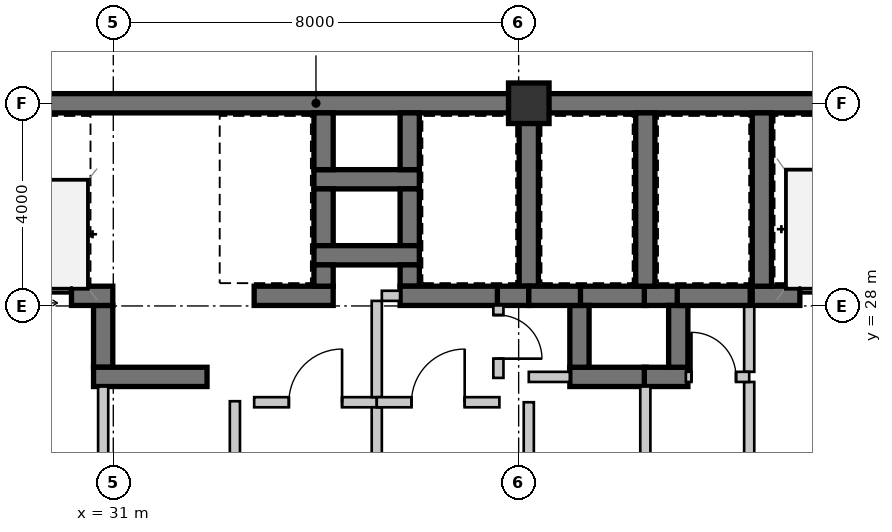
"""IFC4 building model, lengths in metres.
Left out: names, types, materials, properties, quantities, classifications, styles, units other than length and angle.
Written with IfcOpenShell. Run it as: python <this file> out.ifc"""

import sys

from ifc_helpers import new_model, si_unit, direction, frame, frame_2d, origin, origin_2d, place, context, subcontext, project, spatial, rectangle, extrude, source, transform, mapped, element, fill, save


model = new_model("IFC4")
c1 = context("Model", 3, precision=1e-05, world=origin(), true_north=direction((0.0, 1.0)))
c2 = subcontext(c1, "Body", "Model", "MODEL_VIEW")
j1 = project(units=[si_unit("LENGTHUNIT", "METRE"), si_unit("PLANEANGLEUNIT", "RADIAN")], contexts=[c1])
p1 = place(None, origin())
s1 = spatial("IfcSite", under=j1, at=p1, CompositionType="ELEMENT")
p2 = place(p1, origin())
s2 = spatial("IfcBuilding", under=s1, at=p2, CompositionType="ELEMENT")
p3 = place(p2, frame((0.0, 0.0, 45.15)))
s3 = spatial("IfcBuildingStorey", under=s2, at=p3, CompositionType="ELEMENT", Elevation=45.15)
m1 = source(origin(), c2, "Body", "SweptSolid", [
    extrude(rectangle(XDim=0.8, YDim=0.8, at=origin_2d()), origin(), (0.0, 0.0, 1.0), 3.15),
])
p4 = place(p3, frame((39.2, 32.0, 0.0), z_axis=(0.0, 0.0, 1.0), x_axis=(1.0, 0.0, 0.0)))
e1 = element("IfcColumn", 1, at=p4, inside=s3, PredefinedType="COLUMN", context=c2, shape_type="MappedRepresentation", body=[
    mapped(m1, transform((0.0, 0.0, 0.0), scale=1.0)),
])
m2 = source(origin(), c2, "Body", "SweptSolid", [
    extrude(rectangle(XDim=11.2, YDim=0.38, at=frame_2d((5.6, 0.0))), origin(), (0.0, 0.0, 1.0), 2.93),
])
p5 = place(p3, frame((28.0, 32.0, 0.0), z_axis=(0.0, 0.0, 1.0), x_axis=(1.0, 0.0, 0.0)))
e2 = element("IfcWall", 2, at=p5, inside=s3, PredefinedType="SHEAR", context=c2, shape_type="MappedRepresentation", body=[
    mapped(m2, transform((0.0, 0.0, 0.0), scale=1.0)),
])
m3 = source(origin(), c2, "Body", "SweptSolid", [
    extrude(rectangle(XDim=11.99, YDim=0.38, at=frame_2d((5.995, 0.0))), origin(), (0.0, 0.0, 1.0), 2.93),
])
p6 = place(p3, frame((39.2, 32.0, 0.0), z_axis=(0.0, 0.0, 1.0), x_axis=(1.0, 0.0, 0.0)))
e3 = element("IfcWall", 3, at=p6, inside=s3, PredefinedType="SHEAR", context=c2, shape_type="MappedRepresentation", body=[
    mapped(m3, transform((0.0, 0.0, 0.0), scale=1.0)),
])
m4 = source(origin(), c2, "Body", "SweptSolid", [
    extrude(rectangle(XDim=2.98, YDim=0.38, at=frame_2d((1.49, 0.0))), origin(), (0.0, 0.0, 1.0), 2.93),
])
p7 = place(p3, frame((43.61, 28.2, 0.0), z_axis=(0.0, 0.0, 1.0), x_axis=(1.0, 0.0, 0.0)))
e4 = element("IfcWall", 4, at=p7, inside=s3, PredefinedType="SHEAR", context=c2, shape_type="MappedRepresentation", body=[
    mapped(m4, transform((0.0, 0.0, 0.0), scale=1.0)),
])
m5 = source(origin(), c2, "Body", "SweptSolid", [
    extrude(rectangle(XDim=1.1, YDim=2.15, at=frame_2d((0.55, 1.075))), frame((0.0, 0.2, 0.0), z_axis=(0.0, -1.0, 0.0), x_axis=(1.0, 0.0, 0.0)), (0.0, 0.0, 1.0), 0.4),
])
p8 = place(p7, frame((0.94, 0.0, 0.0)))
e5 = element("IfcOpeningElement", 5, at=p8, cuts=e4, PredefinedType="OPENING", context=c2, shape_type="MappedRepresentation", body=[
    mapped(m5, transform((0.0, 0.0, 0.0), scale=1.0)),
])
m6 = source(origin(), c2, "Body", "SweptSolid", [
    extrude(rectangle(XDim=3.42, YDim=0.38, at=frame_2d((1.71, 0.0))), origin(), (0.0, 0.0, 1.0), 2.93),
])
p9 = place(p3, frame((43.8, 31.81, 0.0), z_axis=(0.0, 0.0, 1.0), x_axis=(0.0, -1.0, 0.0)))
e6 = element("IfcWall", 6, at=p9, inside=s3, PredefinedType="SHEAR", context=c2, shape_type="MappedRepresentation", body=[
    mapped(m6, transform((0.0, 0.0, 0.0), scale=1.0)),
])
m7 = source(origin(), c2, "Body", "SweptSolid", [
    extrude(rectangle(XDim=2.4, YDim=0.2, at=frame_2d((1.2, 0.0))), origin(), (0.0, 0.0, 1.0), 2.93),
])
p10 = place(p3, frame((43.55, 26.5, 0.0), z_axis=(0.0, 0.0, 1.0), x_axis=(0.0, -1.0, 0.0)))
e7 = element("IfcWall", 7, at=p10, inside=s3, PredefinedType="SOLIDWALL", context=c2, shape_type="MappedRepresentation", body=[
    mapped(m7, transform((0.0, 0.0, 0.0), scale=1.0)),
])
m8 = source(origin(), c2, "Body", "SweptSolid", [
    extrude(rectangle(XDim=1.31, YDim=0.2, at=frame_2d((0.655, 0.0))), origin(), (0.0, 0.0, 1.0), 2.93),
])
p11 = place(p3, frame((43.55, 28.01, 0.0), z_axis=(0.0, 0.0, 1.0), x_axis=(0.0, -1.0, 0.0)))
e8 = element("IfcWall", 8, at=p11, inside=s3, PredefinedType="SOLIDWALL", context=c2, shape_type="MappedRepresentation", body=[
    mapped(m8, transform((0.0, 0.0, 0.0), scale=1.0)),
])
m9 = source(origin(), c2, "Body", "SweptSolid", [
    extrude(rectangle(XDim=2.08, YDim=0.38, at=frame_2d((1.04, 0.0))), origin(), (0.0, 0.0, 1.0), 2.93),
])
p12 = place(p3, frame((34.96, 30.5, 0.0), z_axis=(0.0, 0.0, 1.0), x_axis=(1.0, 0.0, 0.0)))
e9 = element("IfcWall", 9, at=p12, inside=s3, PredefinedType="SHEAR", context=c2, shape_type="MappedRepresentation", body=[
    mapped(m9, transform((0.0, 0.0, 0.0), scale=1.0)),
])
m10 = source(origin(), c2, "Body", "SweptSolid", [
    extrude(rectangle(XDim=1.12, YDim=0.38, at=frame_2d((0.56, 0.0))), origin(), (0.0, 0.0, 1.0), 2.93),
])
for number, where, z_axis, x_axis in (
    (10, (35.15, 31.81, 0.0), (0.0, 0.0, 1.0), (0.0, -1.0, 0.0)),
    (11, (36.85, 30.69, 0.0), (0.0, 0.0, 1.0), (0.0, 1.0, 0.0)),
    (12, (35.15, 30.31, 0.0), (0.0, 0.0, 1.0), (0.0, -1.0, 0.0)),
    (13, (36.85, 29.19, 0.0), (0.0, 0.0, 1.0), (0.0, 1.0, 0.0)),
):
    element("IfcWall", number, at=place(p3, frame(where, z_axis=z_axis, x_axis=x_axis)), inside=s3, PredefinedType="SHEAR", context=c2, shape_type="MappedRepresentation", body=[
        mapped(m10, transform((0.0, 0.0, 0.0), scale=1.0)),
    ])
p13 = place(p3, frame((34.96, 29.0, 0.0), z_axis=(0.0, 0.0, 1.0), x_axis=(1.0, 0.0, 0.0)))
e14 = element("IfcWall", 14, at=p13, inside=s3, PredefinedType="SHEAR", context=c2, shape_type="MappedRepresentation", body=[
    mapped(m9, transform((0.0, 0.0, 0.0), scale=1.0)),
])
m11 = source(origin(), c2, "Body", "SweptSolid", [
    extrude(rectangle(XDim=1.22, YDim=0.38, at=frame_2d((0.61, 0.0))), origin(), (0.0, 0.0, 1.0), 2.93),
])
p14 = place(p3, frame((30.8, 28.01, 0.0), z_axis=(0.0, 0.0, 1.0), x_axis=(0.0, -1.0, 0.0)))
e15 = element("IfcWall", 15, at=p14, inside=s3, PredefinedType="SHEAR", context=c2, shape_type="MappedRepresentation", body=[
    mapped(m11, transform((0.0, 0.0, 0.0), scale=1.0)),
])
m12 = source(origin(), c2, "Body", "SweptSolid", [
    extrude(rectangle(XDim=2.24, YDim=0.38, at=frame_2d((1.12, 0.0))), origin(), (0.0, 0.0, 1.0), 2.93),
])
p15 = place(p3, frame((30.61, 26.6, 0.0), z_axis=(0.0, 0.0, 1.0), x_axis=(1.0, 0.0, 0.0)))
e16 = element("IfcWall", 16, at=p15, inside=s3, PredefinedType="SHEAR", context=c2, shape_type="MappedRepresentation", body=[
    mapped(m12, transform((0.0, 0.0, 0.0), scale=1.0)),
])
m13 = source(origin(), c2, "Body", "SweptSolid", [
    extrude(rectangle(XDim=1.32, YDim=0.38, at=frame_2d((0.66, 0.0))), origin(), (0.0, 0.0, 1.0), 2.93),
])
p16 = place(p3, frame((41.52, 28.2, 0.0), z_axis=(0.0, 0.0, 1.0), x_axis=(-1.0, 0.0, 0.0)))
e17 = element("IfcWall", 17, at=p16, inside=s3, PredefinedType="SHEAR", context=c2, shape_type="MappedRepresentation", body=[
    mapped(m13, transform((0.0, 0.0, 0.0), scale=1.0)),
])
m14 = source(origin(), c2, "Body", "SweptSolid", [
    extrude(rectangle(XDim=0.67, YDim=0.38, at=frame_2d((0.335, 0.0))), origin(), (0.0, 0.0, 1.0), 2.93),
])
p17 = place(p3, frame((42.15, 28.2, 0.0), z_axis=(0.0, 0.0, 1.0), x_axis=(-1.0, 0.0, 0.0)))
e18 = element("IfcWall", 18, at=p17, inside=s3, PredefinedType="SHEAR", context=c2, shape_type="MappedRepresentation", body=[
    mapped(m14, transform((0.0, 0.0, 0.0), scale=1.0)),
])
m15 = source(origin(), c2, "Body", "SweptSolid", [
    extrude(rectangle(XDim=1.51, YDim=0.38, at=frame_2d((0.755, 0.0))), origin(), (0.0, 0.0, 1.0), 2.93),
])
p18 = place(p3, frame((40.01, 26.6, 0.0), z_axis=(0.0, 0.0, 1.0), x_axis=(1.0, 0.0, 0.0)))
e19 = element("IfcWall", 19, at=p18, inside=s3, PredefinedType="SHEAR", context=c2, shape_type="MappedRepresentation", body=[
    mapped(m15, transform((0.0, 0.0, 0.0), scale=1.0)),
])
p19 = place(p3, frame((40.2, 28.01, 0.0), z_axis=(0.0, 0.0, 1.0), x_axis=(0.0, -1.0, 0.0)))
e20 = element("IfcWall", 20, at=p19, inside=s3, PredefinedType="SHEAR", context=c2, shape_type="MappedRepresentation", body=[
    mapped(m11, transform((0.0, 0.0, 0.0), scale=1.0)),
])
m16 = source(origin(), c2, "Body", "SweptSolid", [
    extrude(rectangle(XDim=0.86, YDim=0.38, at=frame_2d((0.43, 0.0))), origin(), (0.0, 0.0, 1.0), 2.93),
])
p20 = place(p3, frame((41.48, 26.6, 0.0), z_axis=(0.0, 0.0, 1.0), x_axis=(1.0, 0.0, 0.0)))
e21 = element("IfcWall", 21, at=p20, inside=s3, PredefinedType="SHEAR", context=c2, shape_type="MappedRepresentation", body=[
    mapped(m16, transform((0.0, 0.0, 0.0), scale=1.0)),
])
p21 = place(p3, frame((42.15, 26.79, 0.0), z_axis=(0.0, 0.0, 1.0), x_axis=(0.0, 1.0, 0.0)))
e22 = element("IfcWall", 22, at=p21, inside=s3, PredefinedType="SHEAR", context=c2, shape_type="MappedRepresentation", body=[
    mapped(m11, transform((0.0, 0.0, 0.0), scale=1.0)),
])
m17 = source(origin(), c2, "Body", "SweptSolid", [
    extrude(rectangle(XDim=2.49, YDim=0.38, at=frame_2d((1.245, 0.0))), origin(), (0.0, 0.0, 1.0), 2.93),
])
p22 = place(p3, frame((28.5, 28.2, 0.0), z_axis=(0.0, 0.0, 1.0), x_axis=(1.0, 0.0, 0.0)))
e23 = element("IfcWall", 23, at=p22, inside=s3, PredefinedType="SHEAR", context=c2, shape_type="MappedRepresentation", body=[
    mapped(m17, transform((0.0, 0.0, 0.0), scale=1.0)),
])
m18 = source(origin(), c2, "Body", "SweptSolid", [
    extrude(rectangle(XDim=1.05, YDim=2.15, at=frame_2d((0.525, 1.075))), frame((0.0, 0.2, 0.0), z_axis=(0.0, -1.0, 0.0), x_axis=(1.0, 0.0, 0.0)), (0.0, 0.0, 1.0), 0.4),
])
p23 = place(p22, frame((0.625, 0.0, 0.0)))
e24 = element("IfcOpeningElement", 24, at=p23, cuts=e23, PredefinedType="OPENING", context=c2, shape_type="MappedRepresentation", body=[
    mapped(m18, transform((0.0, 0.0, 0.0), scale=1.0)),
])
m19 = source(origin(), c2, "Body", "SweptSolid", [
    extrude(rectangle(XDim=2.31, YDim=0.2, at=frame_2d((1.155, 0.0))), origin(), (0.0, 0.0, 1.0), 2.93),
])
p24 = place(p3, frame((30.8, 26.41, 0.0), z_axis=(0.0, 0.0, 1.0), x_axis=(0.0, -1.0, 0.0)))
e25 = element("IfcWall", 25, at=p24, inside=s3, PredefinedType="SOLIDWALL", context=c2, shape_type="MappedRepresentation", body=[
    mapped(m19, transform((0.0, 0.0, 0.0), scale=1.0)),
])
m20 = source(origin(), c2, "Body", "SweptSolid", [
    extrude(rectangle(XDim=1.56, YDim=0.38, at=frame_2d((0.78, 0.0))), origin(), (0.0, 0.0, 1.0), 2.93),
])
p25 = place(p3, frame((33.78, 28.2, 0.0), z_axis=(0.0, 0.0, 1.0), x_axis=(1.0, 0.0, 0.0)))
e26 = element("IfcWall", 26, at=p25, inside=s3, PredefinedType="SHEAR", context=c2, shape_type="MappedRepresentation", body=[
    mapped(m20, transform((0.0, 0.0, 0.0), scale=1.0)),
])
m21 = source(origin(), c2, "Body", "SweptSolid", [
    extrude(rectangle(XDim=0.42, YDim=0.38, at=frame_2d((0.21, 0.0))), origin(), (0.0, 0.0, 1.0), 2.93),
])
p26 = place(p3, frame((35.15, 28.39, 0.0), z_axis=(0.0, 0.0, 1.0), x_axis=(0.0, 1.0, 0.0)))
e27 = element("IfcWall", 27, at=p26, inside=s3, PredefinedType="SHEAR", context=c2, shape_type="MappedRepresentation", body=[
    mapped(m21, transform((0.0, 0.0, 0.0), scale=1.0)),
])
p27 = place(p3, frame((39.2, 28.39, 0.0), z_axis=(0.0, 0.0, 1.0), x_axis=(0.0, 1.0, 0.0)))
e28 = element("IfcWall", 28, at=p27, inside=s3, PredefinedType="SHEAR", context=c2, shape_type="MappedRepresentation", body=[
    mapped(m6, transform((0.0, 0.0, 0.0), scale=1.0)),
])
p28 = place(p3, frame((36.85, 28.81, 0.0), z_axis=(0.0, 0.0, 1.0), x_axis=(0.0, -1.0, 0.0)))
e29 = element("IfcWall", 29, at=p28, inside=s3, PredefinedType="SHEAR", context=c2, shape_type="MappedRepresentation", body=[
    mapped(m21, transform((0.0, 0.0, 0.0), scale=1.0)),
])
m22 = source(origin(), c2, "Body", "SweptSolid", [
    extrude(rectangle(XDim=1.96, YDim=0.38, at=frame_2d((0.98, 0.0))), origin(), (0.0, 0.0, 1.0), 2.93),
])
p29 = place(p3, frame((36.66, 28.2, 0.0), z_axis=(0.0, 0.0, 1.0), x_axis=(1.0, 0.0, 0.0)))
e30 = element("IfcWall", 30, at=p29, inside=s3, PredefinedType="SHEAR", context=c2, shape_type="MappedRepresentation", body=[
    mapped(m22, transform((0.0, 0.0, 0.0), scale=1.0)),
])
m23 = source(origin(), c2, "Body", "SweptSolid", [
    extrude(rectangle(XDim=0.62, YDim=0.38, at=frame_2d((0.31, 0.0))), origin(), (0.0, 0.0, 1.0), 2.93),
])
p30 = place(p3, frame((38.58, 28.2, 0.0), z_axis=(0.0, 0.0, 1.0), x_axis=(1.0, 0.0, 0.0)))
e31 = element("IfcWall", 31, at=p30, inside=s3, PredefinedType="SHEAR", context=c2, shape_type="MappedRepresentation", body=[
    mapped(m23, transform((0.0, 0.0, 0.0), scale=1.0)),
])
p31 = place(p3, frame((41.5, 28.39, 0.0), z_axis=(0.0, 0.0, 1.0), x_axis=(0.0, 1.0, 0.0)))
e32 = element("IfcWall", 32, at=p31, inside=s3, PredefinedType="SHEAR", context=c2, shape_type="MappedRepresentation", body=[
    mapped(m6, transform((0.0, 0.0, 0.0), scale=1.0)),
])
m24 = source(origin(), c2, "Body", "SweptSolid", [
    extrude(rectangle(XDim=1.02, YDim=0.38, at=frame_2d((0.51, 0.0))), origin(), (0.0, 0.0, 1.0), 2.93),
])
p32 = place(p3, frame((39.2, 28.2, 0.0), z_axis=(0.0, 0.0, 1.0), x_axis=(1.0, 0.0, 0.0)))
e33 = element("IfcWall", 33, at=p32, inside=s3, PredefinedType="SHEAR", context=c2, shape_type="MappedRepresentation", body=[
    mapped(m24, transform((0.0, 0.0, 0.0), scale=1.0)),
])
m25 = source(origin(), c2, "Body", "SweptSolid", [
    extrude(rectangle(XDim=1.44, YDim=0.38, at=frame_2d((0.72, 0.0))), origin(), (0.0, 0.0, 1.0), 2.93),
])
p33 = place(p3, frame((42.13, 28.2, 0.0), z_axis=(0.0, 0.0, 1.0), x_axis=(1.0, 0.0, 0.0)))
e34 = element("IfcWall", 34, at=p33, inside=s3, PredefinedType="SHEAR", context=c2, shape_type="MappedRepresentation", body=[
    mapped(m25, transform((0.0, 0.0, 0.0), scale=1.0)),
])
m26 = source(origin(), c2, "Body", "SweptSolid", [
    extrude(rectangle(XDim=2.02, YDim=0.2, at=frame_2d((1.01, 0.0))), origin(), (0.0, 0.0, 1.0), 2.93),
])
p34 = place(p3, frame((33.4, 26.12, 0.0), z_axis=(0.0, 0.0, 1.0), x_axis=(0.0, -1.0, 0.0)))
e35 = element("IfcWall", 35, at=p34, inside=s3, PredefinedType="SOLIDWALL", context=c2, shape_type="MappedRepresentation", body=[
    mapped(m26, transform((0.0, 0.0, 0.0), scale=1.0)),
])
m27 = source(origin(), c2, "Body", "SweptSolid", [
    extrude(rectangle(XDim=2.42, YDim=0.2, at=frame_2d((1.21, 0.0))), origin(), (0.0, 0.0, 1.0), 2.93),
])
p35 = place(p3, frame((33.78, 26.1, 0.0), z_axis=(0.0, 0.0, 1.0), x_axis=(1.0, 0.0, 0.0)))
e36 = element("IfcWall", 36, at=p35, inside=s3, PredefinedType="SOLIDWALL", context=c2, shape_type="MappedRepresentation", body=[
    mapped(m27, transform((0.0, 0.0, 0.0), scale=1.0)),
])
m28 = source(origin(), c2, "Body", "SweptSolid", [
    extrude(rectangle(XDim=1.05, YDim=2.1, at=frame_2d((0.525, 1.05))), frame((0.0, 0.11, 0.0), z_axis=(0.0, -1.0, 0.0), x_axis=(1.0, 0.0, 0.0)), (0.0, 0.0, 1.0), 0.22),
])
p36 = place(p35, frame((0.685, 0.0, 0.0)))
e37 = element("IfcOpeningElement", 37, at=p36, cuts=e36, PredefinedType="OPENING", context=c2, shape_type="MappedRepresentation", body=[
    mapped(m28, transform((0.0, 0.0, 0.0), scale=1.0)),
])
m29 = source(origin(), c2, "Body", "SweptSolid", [
    extrude(rectangle(XDim=1.9, YDim=0.2, at=frame_2d((0.95, 0.0))), origin(), (0.0, 0.0, 1.0), 2.93),
])
p37 = place(p3, frame((36.2, 26.0, 0.0), z_axis=(0.0, 0.0, 1.0), x_axis=(0.0, -1.0, 0.0)))
e38 = element("IfcWall", 38, at=p37, inside=s3, PredefinedType="SOLIDWALL", context=c2, shape_type="MappedRepresentation", body=[
    mapped(m29, transform((0.0, 0.0, 0.0), scale=1.0)),
])
m30 = source(origin(), c2, "Body", "SweptSolid", [
    extrude(rectangle(XDim=1.9, YDim=0.2, at=frame_2d((0.95, 0.0))), origin(), (0.0, 0.0, 1.0), 2.93),
])
p38 = place(p3, frame((36.2, 28.1, 0.0), z_axis=(0.0, 0.0, 1.0), x_axis=(0.0, -1.0, 0.0)))
e39 = element("IfcWall", 39, at=p38, inside=s3, PredefinedType="SOLIDWALL", context=c2, shape_type="MappedRepresentation", body=[
    mapped(m30, transform((0.0, 0.0, 0.0), scale=1.0)),
])
m31 = source(origin(), c2, "Body", "SweptSolid", [
    extrude(rectangle(XDim=0.36, YDim=0.2, at=frame_2d((0.18, 0.0))), origin(), (0.0, 0.0, 1.0), 2.93),
])
p39 = place(p3, frame((36.66, 28.2, 0.0), z_axis=(0.0, 0.0, 1.0), x_axis=(-1.0, 0.0, 0.0)))
e40 = element("IfcWall", 40, at=p39, inside=s3, PredefinedType="SOLIDWALL", context=c2, shape_type="MappedRepresentation", body=[
    mapped(m31, transform((0.0, 0.0, 0.0), scale=1.0)),
])
m32 = source(origin(), c2, "Body", "SweptSolid", [
    extrude(rectangle(XDim=2.42, YDim=0.2, at=frame_2d((1.21, 0.0))), origin(), (0.0, 0.0, 1.0), 2.93),
])
p40 = place(p3, frame((36.2, 26.1, 0.0), z_axis=(0.0, 0.0, 1.0), x_axis=(1.0, 0.0, 0.0)))
e41 = element("IfcWall", 41, at=p40, inside=s3, PredefinedType="SOLIDWALL", context=c2, shape_type="MappedRepresentation", body=[
    mapped(m32, transform((0.0, 0.0, 0.0), scale=1.0)),
])
p41 = place(p40, frame((0.685, 0.0, 0.0)))
e42 = element("IfcOpeningElement", 42, at=p41, cuts=e41, PredefinedType="OPENING", context=c2, shape_type="MappedRepresentation", body=[
    mapped(m28, transform((0.0, 0.0, 0.0), scale=1.0)),
])
m33 = source(origin(), c2, "Body", "SweptSolid", [
    extrude(rectangle(XDim=2.0, YDim=0.2, at=frame_2d((1.0, 0.0))), origin(), (0.0, 0.0, 1.0), 2.47),
])
p42 = place(p3, frame((39.2, 26.1, 0.0), z_axis=(0.0, 0.0, 1.0), x_axis=(0.0, -1.0, 0.0)))
e43 = element("IfcWall", 43, at=p42, inside=s3, PredefinedType="SOLIDWALL", context=c2, shape_type="MappedRepresentation", body=[
    mapped(m33, transform((0.0, 0.0, 0.0), scale=1.0)),
])
m34 = source(origin(), c2, "Body", "SweptSolid", [
    extrude(rectangle(XDim=1.43, YDim=0.2, at=frame_2d((0.715, 0.0))), origin(), (0.0, 0.0, 1.0), 2.93),
])
p43 = place(p3, frame((38.6, 28.01, 0.0), z_axis=(0.0, 0.0, 1.0), x_axis=(0.0, -1.0, 0.0)))
e44 = element("IfcWall", 44, at=p43, inside=s3, PredefinedType="SOLIDWALL", context=c2, shape_type="MappedRepresentation", body=[
    mapped(m34, transform((0.0, 0.0, 0.0), scale=1.0)),
])
m35 = source(origin(), c2, "Body", "SweptSolid", [
    extrude(rectangle(XDim=0.86, YDim=2.1, at=frame_2d((0.43, 1.05))), frame((0.0, 0.11, 0.0), z_axis=(0.0, -1.0, 0.0), x_axis=(1.0, 0.0, 0.0)), (0.0, 0.0, 1.0), 0.22),
])
p44 = place(p43, frame((0.19, 0.0, 0.0)))
e45 = element("IfcOpeningElement", 45, at=p44, cuts=e44, PredefinedType="OPENING", context=c2, shape_type="MappedRepresentation", body=[
    mapped(m35, transform((0.0, 0.0, 0.0), scale=1.0)),
])
m36 = source(origin(), c2, "Body", "SweptSolid", [
    extrude(rectangle(XDim=0.81, YDim=0.2, at=frame_2d((0.405, 0.0))), origin(), (0.0, 0.0, 1.0), 2.93),
])
p45 = place(p3, frame((39.2, 26.6, 0.0), z_axis=(0.0, 0.0, 1.0), x_axis=(1.0, 0.0, 0.0)))
e46 = element("IfcWall", 46, at=p45, inside=s3, PredefinedType="SOLIDWALL", context=c2, shape_type="MappedRepresentation", body=[
    mapped(m36, transform((0.0, 0.0, 0.0), scale=1.0)),
])
p46 = place(p3, frame((41.5, 26.41, 0.0), z_axis=(0.0, 0.0, 1.0), x_axis=(0.0, -1.0, 0.0)))
e47 = element("IfcWall", 47, at=p46, inside=s3, PredefinedType="SOLIDWALL", context=c2, shape_type="MappedRepresentation", body=[
    mapped(m19, transform((0.0, 0.0, 0.0), scale=1.0)),
])
m37 = source(origin(), c2, "Body", "SweptSolid", [
    extrude(rectangle(XDim=1.25, YDim=0.2, at=frame_2d((0.625, 0.0))), origin(), (0.0, 0.0, 1.0), 2.93),
])
p47 = place(p3, frame((42.3, 26.6, 0.0), z_axis=(0.0, 0.0, 1.0), x_axis=(1.0, 0.0, 0.0)))
e48 = element("IfcWall", 48, at=p47, inside=s3, PredefinedType="SOLIDWALL", context=c2, shape_type="MappedRepresentation", body=[
    mapped(m37, transform((0.0, 0.0, 0.0), scale=1.0)),
])
m38 = source(origin(), c2, "Body", "SweptSolid", [
    extrude(rectangle(XDim=0.88, YDim=2.1, at=frame_2d((0.44, 1.05))), frame((0.0, 0.11, 0.0), z_axis=(0.0, -1.0, 0.0), x_axis=(1.0, 0.0, 0.0)), (0.0, 0.0, 1.0), 0.22),
])
p48 = place(p47, frame((0.11, 0.0, 0.0)))
e49 = element("IfcOpeningElement", 49, at=p48, cuts=e48, PredefinedType="OPENING", context=c2, shape_type="MappedRepresentation", body=[
    mapped(m38, transform((0.0, 0.0, 0.0), scale=1.0)),
])
m39 = source(origin(), c2, "Body", "SweptSolid", [
    extrude(rectangle(XDim=1.1, YDim=2.15, at=frame_2d((0.55, 1.075))), frame((0.0, 0.025, 0.0), z_axis=(0.0, -1.0, 0.0), x_axis=(1.0, 0.0, 0.0)), (0.0, 0.0, 1.0), 0.05),
])
p49 = place(p8, origin())
e50 = element("IfcDoor", 50, at=p49, inside=s3, OperationType="SLIDING_TO_LEFT", PredefinedType="DOOR", context=c2, shape_type="MappedRepresentation", body=[
    mapped(m39, transform((0.0, 0.0, 0.0), scale=1.0)),
])
fill(e5, e50)
m40 = source(origin(), c2, "Body", "SweptSolid", [
    extrude(rectangle(XDim=1.05, YDim=2.15, at=frame_2d((0.525, 1.075))), frame((0.0, 0.025, 0.0), z_axis=(0.0, -1.0, 0.0), x_axis=(1.0, 0.0, 0.0)), (0.0, 0.0, 1.0), 0.05),
])
p50 = place(p23, origin())
e51 = element("IfcDoor", 51, at=p50, inside=s3, OperationType="SLIDING_TO_LEFT", PredefinedType="DOOR", context=c2, shape_type="MappedRepresentation", body=[
    mapped(m40, transform((0.0, 0.0, 0.0), scale=1.0)),
])
fill(e24, e51)
m41 = source(origin(), c2, "Body", "SweptSolid", [
    extrude(rectangle(XDim=1.05, YDim=2.1, at=frame_2d((0.525, 1.05))), frame((0.0, 0.025, 0.0), z_axis=(0.0, -1.0, 0.0), x_axis=(1.0, 0.0, 0.0)), (0.0, 0.0, 1.0), 0.05),
])
p51 = place(p36, origin())
e52 = element("IfcDoor", 52, at=p51, inside=s3, OperationType="SINGLE_SWING_RIGHT", PredefinedType="DOOR", context=c2, shape_type="MappedRepresentation", body=[
    mapped(m41, transform((0.0, 0.0, 0.0), scale=1.0)),
])
fill(e37, e52)
p52 = place(p41, origin())
e53 = element("IfcDoor", 53, at=p52, inside=s3, OperationType="SINGLE_SWING_RIGHT", PredefinedType="DOOR", context=c2, shape_type="MappedRepresentation", body=[
    mapped(m41, transform((0.0, 0.0, 0.0), scale=1.0)),
])
fill(e42, e53)
m42 = source(origin(), c2, "Body", "SweptSolid", [
    extrude(rectangle(XDim=0.88, YDim=2.1, at=frame_2d((0.44, 1.05))), frame((0.0, 0.025, 0.0), z_axis=(0.0, -1.0, 0.0), x_axis=(1.0, 0.0, 0.0)), (0.0, 0.0, 1.0), 0.05),
])
p53 = place(p48, origin())
e54 = element("IfcDoor", 54, at=p53, inside=s3, OperationType="SINGLE_SWING_LEFT", PredefinedType="DOOR", context=c2, shape_type="MappedRepresentation", body=[
    mapped(m42, transform((0.0, 0.0, 0.0), scale=1.0)),
])
fill(e49, e54)
m43 = source(origin(), c2, "Body", "SweptSolid", [
    extrude(rectangle(XDim=0.86, YDim=2.1, at=frame_2d((0.43, 1.05))), frame((0.0, 0.025, 0.0), z_axis=(0.0, -1.0, 0.0), x_axis=(1.0, 0.0, 0.0)), (0.0, 0.0, 1.0), 0.05),
])
p54 = place(p44, origin())
e55 = element("IfcDoor", 55, at=p54, inside=s3, OperationType="SINGLE_SWING_RIGHT", PredefinedType="DOOR", context=c2, shape_type="MappedRepresentation", body=[
    mapped(m43, transform((0.0, 0.0, 0.0), scale=1.0)),
])
fill(e45, e55)
save(model, sys.argv[1])
